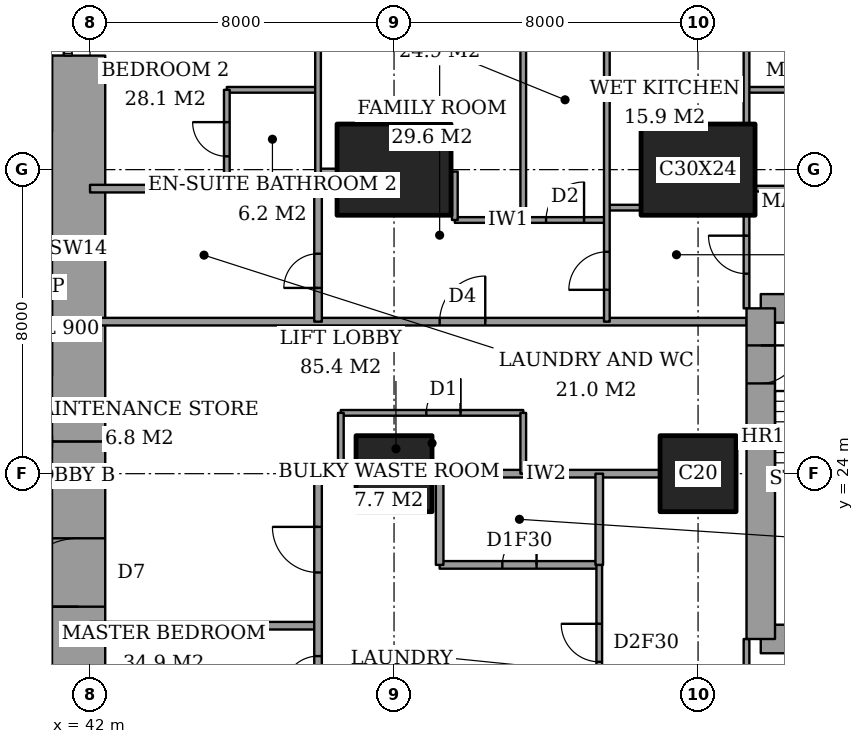
"""IFC4 building model, lengths in metres.
Left out: names, types, materials, properties, quantities, classifications, styles, units other than length and angle.
Written with IfcOpenShell. Run it as: python <this file> out.ifc"""

import sys

from ifc_helpers import new_model, si_unit, direction, frame, frame_2d, origin, origin_2d, place, context, subcontext, project, spatial, rectangle, extrude, element, fill, save


model = new_model("IFC4")
c1 = context("Model", 3, precision=1e-05, world=origin(), true_north=direction((0.0, 1.0)))
c2 = subcontext(c1, "Body", "Model", "MODEL_VIEW")
j1 = project(units=[si_unit("LENGTHUNIT", "METRE"), si_unit("PLANEANGLEUNIT", "RADIAN")], contexts=[c1])
p1 = place(None, origin())
s1 = spatial("IfcSite", under=j1, at=p1, CompositionType="ELEMENT")
p2 = place(p1, origin())
s2 = spatial("IfcBuilding", under=s1, at=p2, CompositionType="ELEMENT")
p3 = place(p2, frame((0.0, 0.0, 47.6)))
s3 = spatial("IfcBuildingStorey", under=s2, at=p3, CompositionType="ELEMENT", Elevation=47.6)
p4 = place(p3, frame((50.0, 24.0, 0.0), z_axis=(0.0, 0.0, 1.0), x_axis=(1.0, 0.0, 0.0)))
e1 = element("IfcColumn", 1, at=p4, inside=s3, PredefinedType="COLUMN", context=c2, shape_type="SweptSolid", body=[
    extrude(rectangle(XDim=2.0, YDim=2.0, at=origin_2d()), origin(), (0.0, 0.0, 1.0), 3.6),
])
p5 = place(p3, frame((50.0, 32.0, 0.0), z_axis=(0.0, 0.0, 1.0), x_axis=(1.0, 0.0, 0.0)))
e2 = element("IfcColumn", 2, at=p5, inside=s3, PredefinedType="COLUMN", context=c2, shape_type="SweptSolid", body=[
    extrude(rectangle(XDim=3.0, YDim=2.4, at=origin_2d()), origin(), (0.0, 0.0, 1.0), 3.6),
])
p6 = place(p3, frame((58.0, 24.0, 0.0), z_axis=(0.0, 0.0, 1.0), x_axis=(1.0, 0.0, 0.0)))
e3 = element("IfcColumn", 3, at=p6, inside=s3, PredefinedType="COLUMN", context=c2, shape_type="SweptSolid", body=[
    extrude(rectangle(XDim=2.0, YDim=2.0, at=origin_2d()), origin(), (0.0, 0.0, 1.0), 3.6),
])
p7 = place(p3, frame((58.0, 32.0, 0.0), z_axis=(0.0, 0.0, 1.0), x_axis=(1.0, 0.0, 0.0)))
e4 = element("IfcColumn", 4, at=p7, inside=s3, PredefinedType="COLUMN", context=c2, shape_type="SweptSolid", body=[
    extrude(rectangle(XDim=3.0, YDim=2.4, at=origin_2d()), origin(), (0.0, 0.0, 1.0), 3.6),
])
p8 = place(p3, frame((41.7, 13.0, 0.0), z_axis=(0.0, 0.0, 1.0), x_axis=(0.0, 1.0, 0.0)))
e5 = element("IfcWall", 5, at=p8, inside=s3, PredefinedType="SHEAR", context=c2, shape_type="SweptSolid", body=[
    extrude(rectangle(XDim=11.85, YDim=1.4, at=frame_2d((5.925, 0.0))), origin(), (0.0, 0.0, 1.0), 3.6),
])
p9 = place(p8, frame((7.5, 0.0, 0.0)))
e6 = element("IfcOpeningElement", 6, at=p9, cuts=e5, PredefinedType="OPENING", context=c2, shape_type="SweptSolid", body=[
    extrude(rectangle(XDim=1.8, YDim=2.4, at=frame_2d((0.9, 1.2))), frame((0.0, 0.71, 0.0), z_axis=(0.0, -1.0, 0.0), x_axis=(1.0, 0.0, 0.0)), (0.0, 0.0, 1.0), 1.42),
])
p10 = place(p3, frame((41.7, 24.85, 0.0), z_axis=(0.0, 0.0, 1.0), x_axis=(0.0, 1.0, 0.0)))
e7 = element("IfcWall", 7, at=p10, inside=s3, PredefinedType="SHEAR", context=c2, shape_type="SweptSolid", body=[
    extrude(rectangle(XDim=10.15, YDim=1.4, at=frame_2d((5.075, 0.0))), origin(), (0.0, 0.0, 1.0), 3.6),
])
for number, where, z_axis, x_axis in (
    (8, (59.65, 19.65, 0.0), (0.0, 0.0, 1.0), (1.0, 0.0, 0.0)),
    (9, (64.1, 28.35, 0.0), (0.0, 0.0, 1.0), (-1.0, 0.0, 0.0)),
):
    element("IfcWall", number, at=place(p3, frame(where, z_axis=z_axis, x_axis=x_axis)), inside=s3, PredefinedType="SHEAR", context=c2, shape_type="SweptSolid", body=[
        extrude(rectangle(XDim=4.45, YDim=0.75, at=frame_2d((2.225, 0.0))), origin(), (0.0, 0.0, 1.0), 3.6),
    ])
p11 = place(p3, frame((59.65, 28.35, 0.0), z_axis=(0.0, 0.0, 1.0), x_axis=(0.0, -1.0, 0.0)))
e10 = element("IfcWall", 10, at=p11, inside=s3, PredefinedType="SHEAR", context=c2, shape_type="SweptSolid", body=[
    extrude(rectangle(XDim=8.7, YDim=0.75, at=frame_2d((4.35, 0.0))), origin(), (0.0, 0.0, 1.0), 3.6),
])
p12 = place(p11, frame((0.975, 0.0, 0.0)))
e11 = element("IfcOpeningElement", 11, at=p12, cuts=e10, PredefinedType="OPENING", context=c2, shape_type="SweptSolid", body=[
    extrude(rectangle(XDim=1.0, YDim=2.1, at=frame_2d((0.5, 1.05))), frame((0.0, 0.385, 0.0), z_axis=(0.0, -1.0, 0.0), x_axis=(1.0, 0.0, 0.0)), (0.0, 0.0, 1.0), 0.77),
])
p13 = place(p3, frame((42.0, 20.0, 0.0), z_axis=(0.0, 0.0, 1.0), x_axis=(1.0, 0.0, 0.0)))
e12 = element("IfcWall", 12, at=p13, inside=s3, PredefinedType="PARTITIONING", context=c2, shape_type="SweptSolid", body=[
    extrude(rectangle(XDim=6.0, YDim=0.2, at=frame_2d((3.0, 0.0))), origin(), (0.0, 0.0, 1.0), 3.35),
])
p14 = place(p3, frame((51.2, 21.6, 0.0), z_axis=(0.0, 0.0, 1.0), x_axis=(1.0, 0.0, 0.0)))
e13 = element("IfcWall", 13, at=p14, inside=s3, PredefinedType="PARTITIONING", context=c2, shape_type="SweptSolid", body=[
    extrude(rectangle(XDim=4.2, YDim=0.2, at=frame_2d((2.1, 0.0))), origin(), (0.0, 0.0, 1.0), 3.35),
])
p15 = place(p14, frame((1.65, 0.0, 0.0)))
e14 = element("IfcOpeningElement", 14, at=p15, cuts=e13, PredefinedType="OPENING", context=c2, shape_type="SweptSolid", body=[
    extrude(rectangle(XDim=0.9, YDim=2.1, at=frame_2d((0.45, 1.05))), frame((0.0, 0.11, 0.0), z_axis=(0.0, -1.0, 0.0), x_axis=(1.0, 0.0, 0.0)), (0.0, 0.0, 1.0), 0.22),
])
p16 = place(p3, frame((48.0, 24.0, 0.0), z_axis=(0.0, 0.0, 1.0), x_axis=(1.0, 0.0, 0.0)))
e15 = element("IfcWall", 15, at=p16, inside=s3, PredefinedType="PARTITIONING", context=c2, shape_type="SweptSolid", body=[
    extrude(rectangle(XDim=1.0, YDim=0.2, at=frame_2d((0.5, 0.0))), origin(), (0.0, 0.0, 1.0), 3.35),
])
p17 = place(p3, frame((51.0, 24.0, 0.0), z_axis=(0.0, 0.0, 1.0), x_axis=(1.0, 0.0, 0.0)))
e16 = element("IfcWall", 16, at=p17, inside=s3, PredefinedType="PARTITIONING", context=c2, shape_type="SweptSolid", body=[
    extrude(rectangle(XDim=6.0, YDim=0.2, at=frame_2d((3.0, 0.0))), origin(), (0.0, 0.0, 1.0), 3.35),
])
p18 = place(p3, frame((48.6, 25.6, 0.0), z_axis=(0.0, 0.0, 1.0), x_axis=(1.0, 0.0, 0.0)))
e17 = element("IfcWall", 17, at=p18, inside=s3, PredefinedType="PARTITIONING", context=c2, shape_type="SweptSolid", body=[
    extrude(rectangle(XDim=4.8, YDim=0.15, at=frame_2d((2.4, 0.0))), origin(), (0.0, 0.0, 1.0), 3.35),
])
p19 = place(p18, frame((2.25, 0.0, 0.0)))
e18 = element("IfcOpeningElement", 18, at=p19, cuts=e17, PredefinedType="OPENING", context=c2, shape_type="SweptSolid", body=[
    extrude(rectangle(XDim=0.9, YDim=2.1, at=frame_2d((0.45, 1.05))), frame((0.0, 0.085, 0.0), z_axis=(0.0, -1.0, 0.0), x_axis=(1.0, 0.0, 0.0)), (0.0, 0.0, 1.0), 0.17),
])
p20 = place(p3, frame((42.0, 28.0, 0.0), z_axis=(0.0, 0.0, 1.0), x_axis=(1.0, 0.0, 0.0)))
e19 = element("IfcWall", 19, at=p20, inside=s3, PredefinedType="PARTITIONING", context=c2, shape_type="SweptSolid", body=[
    extrude(rectangle(XDim=17.275, YDim=0.2, at=frame_2d((8.637, 0.0))), origin(), (0.0, 0.0, 1.0), 3.35),
])
p21 = place(p20, frame((9.2, 0.0, 0.0)))
e20 = element("IfcOpeningElement", 20, at=p21, cuts=e19, PredefinedType="OPENING", context=c2, shape_type="SweptSolid", body=[
    extrude(rectangle(XDim=1.2, YDim=2.4, at=frame_2d((0.6, 1.2))), frame((0.0, 0.11, 0.0), z_axis=(0.0, -1.0, 0.0), x_axis=(1.0, 0.0, 0.0)), (0.0, 0.0, 1.0), 0.22),
])
p22 = place(p3, frame((51.6, 30.675, 0.0), z_axis=(0.0, 0.0, 1.0), x_axis=(1.0, 0.0, 0.0)))
e21 = element("IfcWall", 21, at=p22, inside=s3, PredefinedType="PARTITIONING", context=c2, shape_type="SweptSolid", body=[
    extrude(rectangle(XDim=4.0, YDim=0.15, at=frame_2d((2.0, 0.0))), origin(), (0.0, 0.0, 1.0), 3.35),
])
p23 = place(p22, frame((2.4, 0.0, 0.0)))
e22 = element("IfcOpeningElement", 22, at=p23, cuts=e21, PredefinedType="OPENING", context=c2, shape_type="SweptSolid", body=[
    extrude(rectangle(XDim=1.0, YDim=2.1, at=frame_2d((0.5, 1.05))), frame((0.0, 0.085, 0.0), z_axis=(0.0, -1.0, 0.0), x_axis=(1.0, 0.0, 0.0)), (0.0, 0.0, 1.0), 0.17),
])
p24 = place(p3, frame((55.6, 31.0, 0.0), z_axis=(0.0, 0.0, 1.0), x_axis=(1.0, 0.0, 0.0)))
e23 = element("IfcWall", 23, at=p24, inside=s3, PredefinedType="PARTITIONING", context=c2, shape_type="SweptSolid", body=[
    extrude(rectangle(XDim=0.9, YDim=0.15, at=frame_2d((0.45, 0.0))), origin(), (0.0, 0.0, 1.0), 3.35),
])
p25 = place(p3, frame((42.0, 31.5, 0.0), z_axis=(0.0, 0.0, 1.0), x_axis=(1.0, 0.0, 0.0)))
e24 = element("IfcWall", 24, at=p25, inside=s3, PredefinedType="PARTITIONING", context=c2, shape_type="SweptSolid", body=[
    extrude(rectangle(XDim=6.0, YDim=0.2, at=frame_2d((3.0, 0.0))), origin(), (0.0, 0.0, 1.0), 3.35),
])
p26 = place(p3, frame((59.5, 31.5, 0.0), z_axis=(0.0, 0.0, 1.0), x_axis=(1.0, 0.0, 0.0)))
e25 = element("IfcWall", 25, at=p26, inside=s3, PredefinedType="PARTITIONING", context=c2, shape_type="SweptSolid", body=[
    extrude(rectangle(XDim=5.15, YDim=0.15, at=frame_2d((2.575, 0.0))), origin(), (0.0, 0.0, 1.0), 3.35),
])
p27 = place(p3, frame((48.0, 31.95, 0.0), z_axis=(0.0, 0.0, 1.0), x_axis=(1.0, 0.0, 0.0)))
e26 = element("IfcWall", 26, at=p27, inside=s3, PredefinedType="PARTITIONING", context=c2, shape_type="SweptSolid", body=[
    extrude(rectangle(XDim=0.5, YDim=0.15, at=frame_2d((0.25, 0.0))), origin(), (0.0, 0.0, 1.0), 2.634),
])
p28 = place(p3, frame((45.6, 34.1, 0.0), z_axis=(0.0, 0.0, 1.0), x_axis=(1.0, 0.0, 0.0)))
e27 = element("IfcWall", 27, at=p28, inside=s3, PredefinedType="PARTITIONING", context=c2, shape_type="SweptSolid", body=[
    extrude(rectangle(XDim=2.4, YDim=0.15, at=frame_2d((1.2, 0.0))), origin(), (0.0, 0.0, 1.0), 3.35),
])
p29 = place(p3, frame((59.275, 34.1, 0.0), z_axis=(0.0, 0.0, 1.0), x_axis=(1.0, 0.0, 0.0)))
e28 = element("IfcWall", 28, at=p29, inside=s3, PredefinedType="PARTITIONING", context=c2, shape_type="SweptSolid", body=[
    extrude(rectangle(XDim=2.4, YDim=0.15, at=frame_2d((1.2, 0.0))), origin(), (0.0, 0.0, 1.0), 3.35),
])
p30 = place(p3, frame((45.6, 31.5, 0.0), z_axis=(0.0, 0.0, 1.0), x_axis=(0.0, 1.0, 0.0)))
e29 = element("IfcWall", 29, at=p30, inside=s3, PredefinedType="PARTITIONING", context=c2, shape_type="SweptSolid", body=[
    extrude(rectangle(XDim=2.6, YDim=0.15, at=frame_2d((1.3, 0.0))), origin(), (0.0, 0.0, 1.0), 3.35),
])
p31 = place(p30, frame((0.85, 0.0, 0.0)))
e30 = element("IfcOpeningElement", 30, at=p31, cuts=e29, PredefinedType="OPENING", context=c2, shape_type="SweptSolid", body=[
    extrude(rectangle(XDim=0.9, YDim=2.1, at=frame_2d((0.45, 1.05))), frame((0.0, 0.085, 0.0), z_axis=(0.0, -1.0, 0.0), x_axis=(1.0, 0.0, 0.0)), (0.0, 0.0, 1.0), 0.17),
])
p32 = place(p3, frame((48.0, 17.5, 0.0), z_axis=(0.0, 0.0, 1.0), x_axis=(0.0, 1.0, 0.0)))
e31 = element("IfcWall", 31, at=p32, inside=s3, PredefinedType="PARTITIONING", context=c2, shape_type="SweptSolid", body=[
    extrude(rectangle(XDim=6.5, YDim=0.2, at=frame_2d((3.25, 0.0))), origin(), (0.0, 0.0, 1.0), 3.35),
])
p33 = place(p32, frame((3.9, 0.0, 0.0)))
e32 = element("IfcOpeningElement", 32, at=p33, cuts=e31, PredefinedType="OPENING", context=c2, shape_type="SweptSolid", body=[
    extrude(rectangle(XDim=1.2, YDim=2.4, at=frame_2d((0.6, 1.2))), frame((0.0, 0.11, 0.0), z_axis=(0.0, -1.0, 0.0), x_axis=(1.0, 0.0, 0.0)), (0.0, 0.0, 1.0), 0.22),
])
p34 = place(p32, frame((0.8, 0.0, 0.0)))
e33 = element("IfcOpeningElement", 33, at=p34, cuts=e31, PredefinedType="OPENING", context=c2, shape_type="SweptSolid", body=[
    extrude(rectangle(XDim=0.9, YDim=2.1, at=frame_2d((0.45, 1.05))), frame((0.0, 0.11, 0.0), z_axis=(0.0, -1.0, 0.0), x_axis=(1.0, 0.0, 0.0)), (0.0, 0.0, 1.0), 0.22),
])
p35 = place(p3, frame((48.0, 28.0, 0.0), z_axis=(0.0, 0.0, 1.0), x_axis=(0.0, 1.0, 0.0)))
e34 = element("IfcWall", 34, at=p35, inside=s3, PredefinedType="PARTITIONING", context=c2, shape_type="SweptSolid", body=[
    extrude(rectangle(XDim=3.5, YDim=0.2, at=frame_2d((1.75, 0.0))), origin(), (0.0, 0.0, 1.0), 3.35),
])
p36 = place(p35, frame((0.887, 0.0, 0.0)))
e35 = element("IfcOpeningElement", 35, at=p36, cuts=e34, PredefinedType="OPENING", context=c2, shape_type="SweptSolid", body=[
    extrude(rectangle(XDim=0.9, YDim=2.1, at=frame_2d((0.45, 1.05))), frame((0.0, 0.11, 0.0), z_axis=(0.0, -1.0, 0.0), x_axis=(1.0, 0.0, 0.0)), (0.0, 0.0, 1.0), 0.22),
])
p37 = place(p3, frame((48.0, 31.5, 0.0), z_axis=(0.0, 0.0, 1.0), x_axis=(0.0, 1.0, 0.0)))
e36 = element("IfcWall", 36, at=p37, inside=s3, PredefinedType="PARTITIONING", context=c2, shape_type="SweptSolid", body=[
    extrude(rectangle(XDim=5.5, YDim=0.15, at=frame_2d((2.75, 0.0))), origin(), (0.0, 0.0, 1.0), 3.35),
])
p38 = place(p3, frame((48.6, 24.0, 0.0), z_axis=(0.0, 0.0, 1.0), x_axis=(0.0, 1.0, 0.0)))
e37 = element("IfcWall", 37, at=p38, inside=s3, PredefinedType="PARTITIONING", context=c2, shape_type="SweptSolid", body=[
    extrude(rectangle(XDim=1.6, YDim=0.15, at=frame_2d((0.8, 0.0))), origin(), (0.0, 0.0, 1.0), 3.35),
])
p39 = place(p3, frame((51.2, 21.6, 0.0), z_axis=(0.0, 0.0, 1.0), x_axis=(0.0, 1.0, 0.0)))
e38 = element("IfcWall", 38, at=p39, inside=s3, PredefinedType="PARTITIONING", context=c2, shape_type="SweptSolid", body=[
    extrude(rectangle(XDim=2.4, YDim=0.2, at=frame_2d((1.2, 0.0))), origin(), (0.0, 0.0, 1.0), 3.35),
])
p40 = place(p3, frame((51.6, 30.675, 0.0), z_axis=(0.0, 0.0, 1.0), x_axis=(0.0, 1.0, 0.0)))
e39 = element("IfcWall", 39, at=p40, inside=s3, PredefinedType="PARTITIONING", context=c2, shape_type="SweptSolid", body=[
    extrude(rectangle(XDim=1.275, YDim=0.15, at=frame_2d((0.637, 0.0))), origin(), (0.0, 0.0, 1.0), 3.35),
])
p41 = place(p3, frame((53.4, 24.0, 0.0), z_axis=(0.0, 0.0, 1.0), x_axis=(0.0, 1.0, 0.0)))
e40 = element("IfcWall", 40, at=p41, inside=s3, PredefinedType="PARTITIONING", context=c2, shape_type="SweptSolid", body=[
    extrude(rectangle(XDim=1.6, YDim=0.15, at=frame_2d((0.8, 0.0))), origin(), (0.0, 0.0, 1.0), 3.35),
])
p42 = place(p3, frame((53.4, 30.675, 0.0), z_axis=(0.0, 0.0, 1.0), x_axis=(0.0, 1.0, 0.0)))
e41 = element("IfcWall", 41, at=p42, inside=s3, PredefinedType="PARTITIONING", context=c2, shape_type="SweptSolid", body=[
    extrude(rectangle(XDim=6.325, YDim=0.15, at=frame_2d((3.163, 0.0))), origin(), (0.0, 0.0, 1.0), 3.35),
])
p43 = place(p3, frame((55.4, 21.6, 0.0), z_axis=(0.0, 0.0, 1.0), x_axis=(0.0, 1.0, 0.0)))
e42 = element("IfcWall", 42, at=p43, inside=s3, PredefinedType="PARTITIONING", context=c2, shape_type="SweptSolid", body=[
    extrude(rectangle(XDim=2.4, YDim=0.2, at=frame_2d((1.2, 0.0))), origin(), (0.0, 0.0, 1.0), 3.35),
])
p44 = place(p3, frame((55.4, 10.8, 0.0), z_axis=(0.0, 0.0, 1.0), x_axis=(0.0, 1.0, 0.0)))
e43 = element("IfcWall", 43, at=p44, inside=s3, PredefinedType="PARTITIONING", context=c2, shape_type="SweptSolid", body=[
    extrude(rectangle(XDim=10.8, YDim=0.15, at=frame_2d((5.4, 0.0))), origin(), (0.0, 0.0, 1.0), 3.35),
])
p45 = place(p44, frame((8.25, 0.0, 0.0)))
e44 = element("IfcOpeningElement", 44, at=p45, cuts=e43, PredefinedType="OPENING", context=c2, shape_type="SweptSolid", body=[
    extrude(rectangle(XDim=1.0, YDim=2.1, at=frame_2d((0.5, 1.05))), frame((0.0, 0.085, 0.0), z_axis=(0.0, -1.0, 0.0), x_axis=(1.0, 0.0, 0.0)), (0.0, 0.0, 1.0), 0.17),
])
p46 = place(p3, frame((55.6, 28.0, 0.0), z_axis=(0.0, 0.0, 1.0), x_axis=(0.0, 1.0, 0.0)))
e45 = element("IfcWall", 45, at=p46, inside=s3, PredefinedType="PARTITIONING", context=c2, shape_type="SweptSolid", body=[
    extrude(rectangle(XDim=9.0, YDim=0.15, at=frame_2d((4.5, 0.0))), origin(), (0.0, 0.0, 1.0), 3.35),
])
p47 = place(p46, frame((0.837, 0.0, 0.0)))
e46 = element("IfcOpeningElement", 46, at=p47, cuts=e45, PredefinedType="OPENING", context=c2, shape_type="SweptSolid", body=[
    extrude(rectangle(XDim=1.0, YDim=2.1, at=frame_2d((0.5, 1.05))), frame((0.0, 0.085, 0.0), z_axis=(0.0, -1.0, 0.0), x_axis=(1.0, 0.0, 0.0)), (0.0, 0.0, 1.0), 0.17),
])
p48 = place(p3, frame((59.275, 17.2, 0.0), z_axis=(0.0, 0.0, 1.0), x_axis=(0.0, 1.0, 0.0)))
e47 = element("IfcWall", 47, at=p48, inside=s3, PredefinedType="PARTITIONING", context=c2, shape_type="SweptSolid", body=[
    extrude(rectangle(XDim=2.45, YDim=0.15, at=frame_2d((1.225, 0.0))), origin(), (0.0, 0.0, 1.0), 3.35),
])
p49 = place(p48, frame((0.587, 0.0, 0.0)))
e48 = element("IfcOpeningElement", 48, at=p49, cuts=e47, PredefinedType="OPENING", context=c2, shape_type="SweptSolid", body=[
    extrude(rectangle(XDim=0.9, YDim=2.1, at=frame_2d((0.45, 1.05))), frame((0.0, 0.085, 0.0), z_axis=(0.0, -1.0, 0.0), x_axis=(1.0, 0.0, 0.0)), (0.0, 0.0, 1.0), 0.17),
])
p50 = place(p3, frame((59.275, 28.35, 0.0), z_axis=(0.0, 0.0, 1.0), x_axis=(0.0, 1.0, 0.0)))
e49 = element("IfcWall", 49, at=p50, inside=s3, PredefinedType="PARTITIONING", context=c2, shape_type="SweptSolid", body=[
    extrude(rectangle(XDim=2.45, YDim=0.15, at=frame_2d((1.225, 0.0))), origin(), (0.0, 0.0, 1.0), 3.35),
])
p51 = place(p50, frame((0.913, 0.0, 0.0)))
e50 = element("IfcOpeningElement", 50, at=p51, cuts=e49, PredefinedType="OPENING", context=c2, shape_type="SweptSolid", body=[
    extrude(rectangle(XDim=1.0, YDim=2.1, at=frame_2d((0.5, 1.05))), frame((0.0, 0.085, 0.0), z_axis=(0.0, -1.0, 0.0), x_axis=(1.0, 0.0, 0.0)), (0.0, 0.0, 1.0), 0.17),
])
p52 = place(p3, frame((59.275, 33.2, 0.0), z_axis=(0.0, 0.0, 1.0), x_axis=(0.0, 1.0, 0.0)))
e51 = element("IfcWall", 51, at=p52, inside=s3, PredefinedType="PARTITIONING", context=c2, shape_type="SweptSolid", body=[
    extrude(rectangle(XDim=3.8, YDim=0.15, at=frame_2d((1.9, 0.0))), origin(), (0.0, 0.0, 1.0), 3.35),
])
p53 = place(p45, origin())
e52 = element("IfcDoor", 52, at=p53, inside=s3, OperationType="SINGLE_SWING_LEFT", PredefinedType="DOOR", context=c2, shape_type="SweptSolid", body=[
    extrude(rectangle(XDim=1.0, YDim=2.1, at=frame_2d((0.5, 1.05))), frame((0.0, 0.025, 0.0), z_axis=(0.0, -1.0, 0.0), x_axis=(1.0, 0.0, 0.0)), (0.0, 0.0, 1.0), 0.05),
])
fill(e44, e52)
p54 = place(p15, origin())
e53 = element("IfcDoor", 53, at=p54, inside=s3, OperationType="SINGLE_SWING_LEFT", PredefinedType="DOOR", context=c2, shape_type="SweptSolid", body=[
    extrude(rectangle(XDim=0.9, YDim=2.1, at=frame_2d((0.45, 1.05))), frame((0.0, 0.025, 0.0), z_axis=(0.0, -1.0, 0.0), x_axis=(1.0, 0.0, 0.0)), (0.0, 0.0, 1.0), 0.05),
])
fill(e14, e53)
p55 = place(p33, origin())
e54 = element("IfcDoor", 54, at=p55, inside=s3, OperationType="SINGLE_SWING_LEFT", PredefinedType="DOOR", context=c2, shape_type="SweptSolid", body=[
    extrude(rectangle(XDim=1.2, YDim=2.4, at=frame_2d((0.6, 1.2))), frame((0.0, 0.025, 0.0), z_axis=(0.0, -1.0, 0.0), x_axis=(1.0, 0.0, 0.0)), (0.0, 0.0, 1.0), 0.05),
])
fill(e32, e54)
p56 = place(p34, origin())
e55 = element("IfcDoor", 55, at=p56, inside=s3, OperationType="SINGLE_SWING_RIGHT", PredefinedType="DOOR", context=c2, shape_type="SweptSolid", body=[
    extrude(rectangle(XDim=0.9, YDim=2.1, at=frame_2d((0.45, 1.05))), frame((0.0, 0.025, 0.0), z_axis=(0.0, -1.0, 0.0), x_axis=(1.0, 0.0, 0.0)), (0.0, 0.0, 1.0), 0.05),
])
fill(e33, e55)
p57 = place(p51, origin())
e56 = element("IfcDoor", 56, at=p57, inside=s3, OperationType="SINGLE_SWING_LEFT", PredefinedType="DOOR", context=c2, shape_type="SweptSolid", body=[
    extrude(rectangle(XDim=1.0, YDim=2.1, at=frame_2d((0.5, 1.05))), frame((0.0, 0.025, 0.0), z_axis=(0.0, -1.0, 0.0), x_axis=(1.0, 0.0, 0.0)), (0.0, 0.0, 1.0), 0.05),
])
fill(e50, e56)
p58 = place(p47, origin())
e57 = element("IfcDoor", 57, at=p58, inside=s3, OperationType="SINGLE_SWING_RIGHT", PredefinedType="DOOR", context=c2, shape_type="SweptSolid", body=[
    extrude(rectangle(XDim=1.0, YDim=2.1, at=frame_2d((0.5, 1.05))), frame((0.0, 0.025, 0.0), z_axis=(0.0, -1.0, 0.0), x_axis=(1.0, 0.0, 0.0)), (0.0, 0.0, 1.0), 0.05),
])
fill(e46, e57)
p59 = place(p21, origin())
e58 = element("IfcDoor", 58, at=p59, inside=s3, OperationType="SINGLE_SWING_LEFT", PredefinedType="DOOR", context=c2, shape_type="SweptSolid", body=[
    extrude(rectangle(XDim=1.2, YDim=2.4, at=frame_2d((0.6, 1.2))), frame((0.0, 0.025, 0.0), z_axis=(0.0, -1.0, 0.0), x_axis=(1.0, 0.0, 0.0)), (0.0, 0.0, 1.0), 0.05),
])
fill(e20, e58)
p60 = place(p23, origin())
e59 = element("IfcDoor", 59, at=p60, inside=s3, OperationType="SINGLE_SWING_LEFT", PredefinedType="DOOR", context=c2, shape_type="SweptSolid", body=[
    extrude(rectangle(XDim=1.0, YDim=2.1, at=frame_2d((0.5, 1.05))), frame((0.0, 0.025, 0.0), z_axis=(0.0, -1.0, 0.0), x_axis=(1.0, 0.0, 0.0)), (0.0, 0.0, 1.0), 0.05),
])
fill(e22, e59)
p61 = place(p31, origin())
e60 = element("IfcDoor", 60, at=p61, inside=s3, OperationType="SINGLE_SWING_LEFT", PredefinedType="DOOR", context=c2, shape_type="SweptSolid", body=[
    extrude(rectangle(XDim=0.9, YDim=2.1, at=frame_2d((0.45, 1.05))), frame((0.0, 0.025, 0.0), z_axis=(0.0, -1.0, 0.0), x_axis=(1.0, 0.0, 0.0)), (0.0, 0.0, 1.0), 0.05),
])
fill(e30, e60)
p62 = place(p36, origin())
e61 = element("IfcDoor", 61, at=p62, inside=s3, OperationType="SINGLE_SWING_RIGHT", PredefinedType="DOOR", context=c2, shape_type="SweptSolid", body=[
    extrude(rectangle(XDim=0.9, YDim=2.1, at=frame_2d((0.45, 1.05))), frame((0.0, 0.025, 0.0), z_axis=(0.0, -1.0, 0.0), x_axis=(1.0, 0.0, 0.0)), (0.0, 0.0, 1.0), 0.05),
])
fill(e35, e61)
p63 = place(p19, origin())
e62 = element("IfcDoor", 62, at=p63, inside=s3, OperationType="SINGLE_SWING_LEFT", PredefinedType="DOOR", context=c2, shape_type="SweptSolid", body=[
    extrude(rectangle(XDim=0.9, YDim=2.1, at=frame_2d((0.45, 1.05))), frame((0.0, 0.025, 0.0), z_axis=(0.0, -1.0, 0.0), x_axis=(1.0, 0.0, 0.0)), (0.0, 0.0, 1.0), 0.05),
])
fill(e18, e62)
p64 = place(p9, origin())
e63 = element("IfcDoor", 63, at=p64, inside=s3, OperationType="DOUBLE_DOOR_DOUBLE_SWING", PredefinedType="DOOR", context=c2, shape_type="SweptSolid", body=[
    extrude(rectangle(XDim=1.8, YDim=2.4, at=frame_2d((0.9, 1.2))), frame((0.0, 0.025, 0.0), z_axis=(0.0, -1.0, 0.0), x_axis=(1.0, 0.0, 0.0)), (0.0, 0.0, 1.0), 0.05),
])
fill(e6, e63)
p65 = place(p12, origin())
e64 = element("IfcDoor", 64, at=p65, inside=s3, OperationType="SINGLE_SWING_RIGHT", PredefinedType="DOOR", context=c2, shape_type="SweptSolid", body=[
    extrude(rectangle(XDim=1.0, YDim=2.1, at=frame_2d((0.5, 1.05))), frame((0.0, 0.025, 0.0), z_axis=(0.0, -1.0, 0.0), x_axis=(1.0, 0.0, 0.0)), (0.0, 0.0, 1.0), 0.05),
])
fill(e11, e64)
save(model, sys.argv[1])
